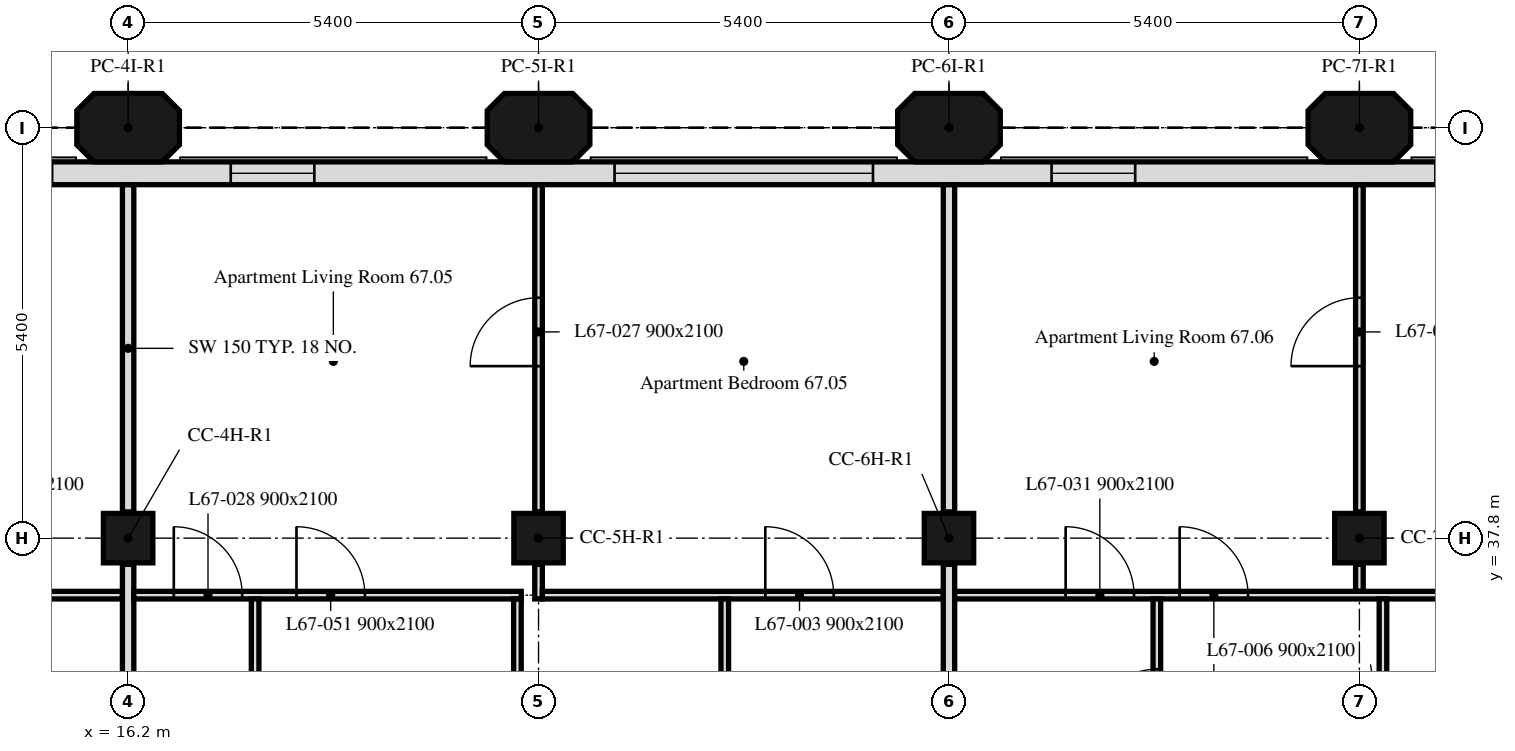
"""IFC4 building model, lengths in metres.
Left out: names, types, materials, properties, quantities, classifications, styles, units other than length and angle.
Written with IfcOpenShell. Run it as: python <this file> out.ifc"""

import sys

from ifc_helpers import new_model, si_unit, direction, frame, frame_2d, origin, origin_2d, place, context, subcontext, project, spatial, polyline, rectangle, outline, extrude, element, fill, save


model = new_model("IFC4")
c1 = context("Model", 3, precision=1e-05, world=origin(), true_north=direction((0.0, 1.0)))
c2 = subcontext(c1, "Body", "Model", "MODEL_VIEW")
j1 = project(units=[si_unit("LENGTHUNIT", "METRE"), si_unit("PLANEANGLEUNIT", "RADIAN")], contexts=[c1])
p1 = place(None, origin())
s1 = spatial("IfcSite", under=j1, at=p1, CompositionType="ELEMENT")
p2 = place(p1, origin())
s2 = spatial("IfcBuilding", under=s1, at=p2, CompositionType="ELEMENT")
p3 = place(p2, frame((0.0, 0.0, 275.2)))
s3 = spatial("IfcBuildingStorey", under=s2, at=p3, CompositionType="ELEMENT", Elevation=275.2)
for number, where, z_axis, x_axis in (
    (1, (16.2, 37.8, 0.0), (0.0, 0.0, 1.0), (1.0, 0.0, 0.0)),
    (2, (21.6, 37.8, 0.0), (0.0, 0.0, 1.0), (1.0, 0.0, 0.0)),
    (3, (27.0, 37.8, 0.0), (0.0, 0.0, 1.0), (1.0, 0.0, 0.0)),
    (4, (32.4, 37.8, 0.0), (0.0, 0.0, 1.0), (1.0, 0.0, 0.0)),
):
    element("IfcColumn", number, at=place(p3, frame(where, z_axis=z_axis, x_axis=x_axis)), inside=s3, PredefinedType="COLUMN", context=c2, shape_type="SweptSolid", body=[
        extrude(rectangle(XDim=0.65, YDim=0.65, at=origin_2d()), origin(), (0.0, 0.0, 1.0), 3.0),
    ])
for number, where, z_axis, x_axis in (
    (5, (16.2, 43.2, 0.0), (0.0, 0.0, 1.0), (1.0, 0.0, 0.0)),
    (6, (21.6, 43.2, 0.0), (0.0, 0.0, 1.0), (1.0, 0.0, 0.0)),
    (7, (27.0, 43.2, 0.0), (0.0, 0.0, 1.0), (1.0, 0.0, 0.0)),
    (8, (32.4, 43.2, 0.0), (0.0, 0.0, 1.0), (1.0, 0.0, 0.0)),
):
    element("IfcColumn", number, at=place(p3, frame(where, z_axis=z_axis, x_axis=x_axis)), inside=s3, PredefinedType="COLUMN", context=c2, shape_type="SweptSolid", body=[
        extrude(outline(polyline([(-0.45, -0.45), (0.45, -0.45), (0.675, -0.225), (0.675, 0.225), (0.45, 0.45), (-0.45, 0.45), (-0.675, 0.225), (-0.675, -0.225), (-0.45, -0.45)])), origin(), (0.0, 0.0, 1.0), 3.0),
    ])
p4 = place(p3, frame((43.014, 42.6, 0.0), z_axis=(0.0, 0.0, 1.0), x_axis=(-1.0, 0.0, 0.0)))
e9 = element("IfcWall", 9, at=p4, inside=s3, PredefinedType="SOLIDWALL", context=c2, shape_type="SweptSolid", body=[
    extrude(rectangle(XDim=32.027, YDim=0.3, at=frame_2d((16.014, 0.0))), origin(), (0.0, 0.0, 1.0), 3.0),
])
p5 = place(p4, frame((2.764, 0.0, 0.9)))
e10 = element("IfcOpeningElement", 10, at=p5, cuts=e9, PredefinedType="OPENING", context=c2, shape_type="SweptSolid", body=[
    extrude(rectangle(XDim=1.1, YDim=1.7, at=frame_2d((0.55, 0.85))), frame((0.0, 0.16, 0.0), z_axis=(0.0, -1.0, 0.0), x_axis=(1.0, 0.0, 0.0)), (0.0, 0.0, 1.0), 0.32),
])
p6 = place(p4, frame((6.214, 0.0, 0.9)))
e11 = element("IfcOpeningElement", 11, at=p6, cuts=e9, PredefinedType="OPENING", context=c2, shape_type="SweptSolid", body=[
    extrude(rectangle(XDim=3.4, YDim=1.7, at=frame_2d((1.7, 0.85))), frame((0.0, 0.16, 0.0), z_axis=(0.0, -1.0, 0.0), x_axis=(1.0, 0.0, 0.0)), (0.0, 0.0, 1.0), 0.32),
])
p7 = place(p4, frame((13.564, 0.0, 0.9)))
e12 = element("IfcOpeningElement", 12, at=p7, cuts=e9, PredefinedType="OPENING", context=c2, shape_type="SweptSolid", body=[
    extrude(rectangle(XDim=1.1, YDim=1.7, at=frame_2d((0.55, 0.85))), frame((0.0, 0.16, 0.0), z_axis=(0.0, -1.0, 0.0), x_axis=(1.0, 0.0, 0.0)), (0.0, 0.0, 1.0), 0.32),
])
p8 = place(p4, frame((17.014, 0.0, 0.9)))
e13 = element("IfcOpeningElement", 13, at=p8, cuts=e9, PredefinedType="OPENING", context=c2, shape_type="SweptSolid", body=[
    extrude(rectangle(XDim=3.4, YDim=1.7, at=frame_2d((1.7, 0.85))), frame((0.0, 0.16, 0.0), z_axis=(0.0, -1.0, 0.0), x_axis=(1.0, 0.0, 0.0)), (0.0, 0.0, 1.0), 0.32),
])
p9 = place(p4, frame((24.364, 0.0, 0.9)))
e14 = element("IfcOpeningElement", 14, at=p9, cuts=e9, PredefinedType="OPENING", context=c2, shape_type="SweptSolid", body=[
    extrude(rectangle(XDim=1.1, YDim=1.7, at=frame_2d((0.55, 0.85))), frame((0.0, 0.16, 0.0), z_axis=(0.0, -1.0, 0.0), x_axis=(1.0, 0.0, 0.0)), (0.0, 0.0, 1.0), 0.32),
])
p10 = place(p4, frame((27.814, 0.0, 0.9)))
e15 = element("IfcOpeningElement", 15, at=p10, cuts=e9, PredefinedType="OPENING", context=c2, shape_type="SweptSolid", body=[
    extrude(rectangle(XDim=3.4, YDim=1.7, at=frame_2d((1.7, 0.85))), frame((0.0, 0.16, 0.0), z_axis=(0.0, -1.0, 0.0), x_axis=(1.0, 0.0, 0.0)), (0.0, 0.0, 1.0), 0.32),
])
p11 = place(p3, frame((6.151, 37.05, 0.0), z_axis=(0.0, 0.0, 1.0), x_axis=(1.0, 0.0, 0.0)))
e16 = element("IfcWall", 16, at=p11, inside=s3, PredefinedType="PARTITIONING", context=c2, shape_type="SweptSolid", body=[
    extrude(rectangle(XDim=9.974, YDim=0.1, at=frame_2d((4.987, 0.0))), origin(), (0.0, 0.0, 1.0), 3.0),
])
p12 = place(p11, frame((8.039, 0.0, 0.0)))
e17 = element("IfcOpeningElement", 17, at=p12, cuts=e16, PredefinedType="OPENING", context=c2, shape_type="SweptSolid", body=[
    extrude(rectangle(XDim=0.9, YDim=2.1, at=frame_2d((0.45, 1.05))), frame((0.0, 0.05, 0.0), z_axis=(0.0, -1.0, 0.0), x_axis=(1.0, 0.0, 0.0)), (0.0, 0.0, 1.0), 0.1),
])
p13 = place(p11, frame((0.879, 0.0, 0.0)))
e18 = element("IfcOpeningElement", 18, at=p13, cuts=e16, PredefinedType="OPENING", context=c2, shape_type="SweptSolid", body=[
    extrude(rectangle(XDim=0.9, YDim=2.1, at=frame_2d((0.45, 1.05))), frame((0.0, 0.05, 0.0), z_axis=(0.0, -1.0, 0.0), x_axis=(1.0, 0.0, 0.0)), (0.0, 0.0, 1.0), 0.1),
])
p14 = place(p11, frame((2.249, 0.0, 0.0)))
e19 = element("IfcOpeningElement", 19, at=p14, cuts=e16, PredefinedType="OPENING", context=c2, shape_type="SweptSolid", body=[
    extrude(rectangle(XDim=0.9, YDim=2.1, at=frame_2d((0.45, 1.05))), frame((0.0, 0.05, 0.0), z_axis=(0.0, -1.0, 0.0), x_axis=(1.0, 0.0, 0.0)), (0.0, 0.0, 1.0), 0.1),
])
p15 = place(p3, frame((16.2, 38.145, 0.0), z_axis=(0.0, 0.0, 1.0), x_axis=(0.0, 1.0, 0.0)))
e20 = element("IfcWall", 20, at=p15, inside=s3, PredefinedType="PARTITIONING", context=c2, shape_type="SweptSolid", body=[
    extrude(rectangle(XDim=4.304, YDim=0.15, at=frame_2d((2.152, 0.0))), origin(), (0.0, 0.0, 1.0), 3.0),
])
p16 = place(p3, frame((16.2, 34.275, 0.0), z_axis=(0.0, 0.0, 1.0), x_axis=(0.0, 1.0, 0.0)))
e21 = element("IfcWall", 21, at=p16, inside=s3, PredefinedType="PARTITIONING", context=c2, shape_type="SweptSolid", body=[
    extrude(rectangle(XDim=3.18, YDim=0.15, at=frame_2d((1.59, 0.0))), origin(), (0.0, 0.0, 1.0), 3.0),
])
p17 = place(p3, frame((16.275, 37.05, 0.0), z_axis=(0.0, 0.0, 1.0), x_axis=(1.0, 0.0, 0.0)))
e22 = element("IfcWall", 22, at=p17, inside=s3, PredefinedType="PARTITIONING", context=c2, shape_type="SweptSolid", body=[
    extrude(rectangle(XDim=5.097, YDim=0.1, at=frame_2d((2.549, 0.0))), origin(), (0.0, 0.0, 1.0), 3.0),
])
p18 = place(p17, frame((0.526, 0.0, 0.0)))
e23 = element("IfcOpeningElement", 23, at=p18, cuts=e22, PredefinedType="OPENING", context=c2, shape_type="SweptSolid", body=[
    extrude(rectangle(XDim=0.9, YDim=2.1, at=frame_2d((0.45, 1.05))), frame((0.0, 0.05, 0.0), z_axis=(0.0, -1.0, 0.0), x_axis=(1.0, 0.0, 0.0)), (0.0, 0.0, 1.0), 0.1),
])
p19 = place(p17, frame((2.14, 0.0, 0.0)))
e24 = element("IfcOpeningElement", 24, at=p19, cuts=e22, PredefinedType="OPENING", context=c2, shape_type="SweptSolid", body=[
    extrude(rectangle(XDim=0.9, YDim=2.1, at=frame_2d((0.45, 1.05))), frame((0.0, 0.05, 0.0), z_axis=(0.0, -1.0, 0.0), x_axis=(1.0, 0.0, 0.0)), (0.0, 0.0, 1.0), 0.1),
])
p20 = place(p3, frame((21.6, 37.0, 0.0), z_axis=(0.0, 0.0, 1.0), x_axis=(0.0, 1.0, 0.0)))
e25 = element("IfcWall", 25, at=p20, inside=s3, PredefinedType="PARTITIONING", context=c2, shape_type="SweptSolid", body=[
    extrude(rectangle(XDim=0.455, YDim=0.1, at=frame_2d((0.228, 0.0))), origin(), (0.0, 0.0, 1.0), 3.0),
])
p21 = place(p3, frame((21.6, 38.145, 0.0), z_axis=(0.0, 0.0, 1.0), x_axis=(0.0, 1.0, 0.0)))
e26 = element("IfcWall", 26, at=p21, inside=s3, PredefinedType="PARTITIONING", context=c2, shape_type="SweptSolid", body=[
    extrude(rectangle(XDim=4.304, YDim=0.1, at=frame_2d((2.152, 0.0))), origin(), (0.0, 0.0, 1.0), 3.0),
])
p22 = place(p21, frame((1.918, 0.0, 0.0)))
e27 = element("IfcOpeningElement", 27, at=p22, cuts=e26, PredefinedType="OPENING", context=c2, shape_type="SweptSolid", body=[
    extrude(rectangle(XDim=0.9, YDim=2.1, at=frame_2d((0.45, 1.05))), frame((0.0, 0.05, 0.0), z_axis=(0.0, -1.0, 0.0), x_axis=(1.0, 0.0, 0.0)), (0.0, 0.0, 1.0), 0.1),
])
p23 = place(p3, frame((21.65, 37.05, 0.0), z_axis=(0.0, 0.0, 1.0), x_axis=(1.0, 0.0, 0.0)))
e28 = element("IfcWall", 28, at=p23, inside=s3, PredefinedType="PARTITIONING", context=c2, shape_type="SweptSolid", body=[
    extrude(rectangle(XDim=5.275, YDim=0.1, at=frame_2d((2.638, 0.0))), origin(), (0.0, 0.0, 1.0), 3.0),
])
p24 = place(p23, frame((2.933, 0.0, 0.0)))
e29 = element("IfcOpeningElement", 29, at=p24, cuts=e28, PredefinedType="OPENING", context=c2, shape_type="SweptSolid", body=[
    extrude(rectangle(XDim=0.9, YDim=2.1, at=frame_2d((0.45, 1.05))), frame((0.0, 0.05, 0.0), z_axis=(0.0, -1.0, 0.0), x_axis=(1.0, 0.0, 0.0)), (0.0, 0.0, 1.0), 0.1),
])
p25 = place(p3, frame((27.0, 38.145, 0.0), z_axis=(0.0, 0.0, 1.0), x_axis=(0.0, 1.0, 0.0)))
e30 = element("IfcWall", 30, at=p25, inside=s3, PredefinedType="PARTITIONING", context=c2, shape_type="SweptSolid", body=[
    extrude(rectangle(XDim=4.304, YDim=0.15, at=frame_2d((2.152, 0.0))), origin(), (0.0, 0.0, 1.0), 3.0),
])
p26 = place(p3, frame((17.871, 34.275, 0.0), z_axis=(0.0, 0.0, 1.0), x_axis=(0.0, 1.0, 0.0)))
e31 = element("IfcWall", 31, at=p26, inside=s3, PredefinedType="PARTITIONING", context=c2, shape_type="SweptSolid", body=[
    extrude(rectangle(XDim=2.725, YDim=0.1, at=frame_2d((1.363, 0.0))), origin(), (0.0, 0.0, 1.0), 3.0),
])
p27 = place(p26, frame((0.563, 0.0, 0.0)))
e32 = element("IfcOpeningElement", 32, at=p27, cuts=e31, PredefinedType="OPENING", context=c2, shape_type="SweptSolid", body=[
    extrude(rectangle(XDim=0.9, YDim=2.1, at=frame_2d((0.45, 1.05))), frame((0.0, 0.05, 0.0), z_axis=(0.0, -1.0, 0.0), x_axis=(1.0, 0.0, 0.0)), (0.0, 0.0, 1.0), 0.1),
])
p28 = place(p3, frame((21.322, 34.275, 0.0), z_axis=(0.0, 0.0, 1.0), x_axis=(0.0, 1.0, 0.0)))
e33 = element("IfcWall", 33, at=p28, inside=s3, PredefinedType="PARTITIONING", context=c2, shape_type="SweptSolid", body=[
    extrude(rectangle(XDim=2.725, YDim=0.1, at=frame_2d((1.363, 0.0))), origin(), (0.0, 0.0, 1.0), 3.0),
])
p29 = place(p28, frame((0.394, 0.0, 0.0)))
e34 = element("IfcOpeningElement", 34, at=p29, cuts=e33, PredefinedType="OPENING", context=c2, shape_type="SweptSolid", body=[
    extrude(rectangle(XDim=0.9, YDim=2.1, at=frame_2d((0.45, 1.05))), frame((0.0, 0.05, 0.0), z_axis=(0.0, -1.0, 0.0), x_axis=(1.0, 0.0, 0.0)), (0.0, 0.0, 1.0), 0.1),
])
p30 = place(p3, frame((24.05, 34.275, 0.0), z_axis=(0.0, 0.0, 1.0), x_axis=(0.0, 1.0, 0.0)))
e35 = element("IfcWall", 35, at=p30, inside=s3, PredefinedType="PARTITIONING", context=c2, shape_type="SweptSolid", body=[
    extrude(rectangle(XDim=2.725, YDim=0.1, at=frame_2d((1.363, 0.0))), origin(), (0.0, 0.0, 1.0), 3.0),
])
p31 = place(p3, frame((27.0, 34.275, 0.0), z_axis=(0.0, 0.0, 1.0), x_axis=(0.0, 1.0, 0.0)))
e36 = element("IfcWall", 36, at=p31, inside=s3, PredefinedType="PARTITIONING", context=c2, shape_type="SweptSolid", body=[
    extrude(rectangle(XDim=3.18, YDim=0.15, at=frame_2d((1.59, 0.0))), origin(), (0.0, 0.0, 1.0), 3.0),
])
p32 = place(p3, frame((32.4, 37.1, 0.0), z_axis=(0.0, 0.0, 1.0), x_axis=(0.0, 1.0, 0.0)))
e37 = element("IfcWall", 37, at=p32, inside=s3, PredefinedType="PARTITIONING", context=c2, shape_type="SweptSolid", body=[
    extrude(rectangle(XDim=0.355, YDim=0.1, at=frame_2d((0.177, 0.0))), origin(), (0.0, 0.0, 1.0), 3.0),
])
p33 = place(p3, frame((32.4, 38.145, 0.0), z_axis=(0.0, 0.0, 1.0), x_axis=(0.0, 1.0, 0.0)))
e38 = element("IfcWall", 38, at=p33, inside=s3, PredefinedType="PARTITIONING", context=c2, shape_type="SweptSolid", body=[
    extrude(rectangle(XDim=4.304, YDim=0.1, at=frame_2d((2.152, 0.0))), origin(), (0.0, 0.0, 1.0), 3.0),
])
p34 = place(p33, frame((1.918, 0.0, 0.0)))
e39 = element("IfcOpeningElement", 39, at=p34, cuts=e38, PredefinedType="OPENING", context=c2, shape_type="SweptSolid", body=[
    extrude(rectangle(XDim=0.9, YDim=2.1, at=frame_2d((0.45, 1.05))), frame((0.0, 0.05, 0.0), z_axis=(0.0, -1.0, 0.0), x_axis=(1.0, 0.0, 0.0)), (0.0, 0.0, 1.0), 0.1),
])
p35 = place(p3, frame((27.075, 37.05, 0.0), z_axis=(0.0, 0.0, 1.0), x_axis=(1.0, 0.0, 0.0)))
e40 = element("IfcWall", 40, at=p35, inside=s3, PredefinedType="PARTITIONING", context=c2, shape_type="SweptSolid", body=[
    extrude(rectangle(XDim=10.65, YDim=0.1, at=frame_2d((5.325, 0.0))), origin(), (0.0, 0.0, 1.0), 3.0),
])
p36 = place(p35, frame((7.946, 0.0, 0.0)))
e41 = element("IfcOpeningElement", 41, at=p36, cuts=e40, PredefinedType="OPENING", context=c2, shape_type="SweptSolid", body=[
    extrude(rectangle(XDim=0.9, YDim=2.1, at=frame_2d((0.45, 1.05))), frame((0.0, 0.05, 0.0), z_axis=(0.0, -1.0, 0.0), x_axis=(1.0, 0.0, 0.0)), (0.0, 0.0, 1.0), 0.1),
])
p37 = place(p35, frame((1.46, 0.0, 0.0)))
e42 = element("IfcOpeningElement", 42, at=p37, cuts=e40, PredefinedType="OPENING", context=c2, shape_type="SweptSolid", body=[
    extrude(rectangle(XDim=0.9, YDim=2.1, at=frame_2d((0.45, 1.05))), frame((0.0, 0.05, 0.0), z_axis=(0.0, -1.0, 0.0), x_axis=(1.0, 0.0, 0.0)), (0.0, 0.0, 1.0), 0.1),
])
p38 = place(p35, frame((2.96, 0.0, 0.0)))
e43 = element("IfcOpeningElement", 43, at=p38, cuts=e40, PredefinedType="OPENING", context=c2, shape_type="SweptSolid", body=[
    extrude(rectangle(XDim=0.9, YDim=2.1, at=frame_2d((0.45, 1.05))), frame((0.0, 0.05, 0.0), z_axis=(0.0, -1.0, 0.0), x_axis=(1.0, 0.0, 0.0)), (0.0, 0.0, 1.0), 0.1),
])
p39 = place(p3, frame((29.735, 34.275, 0.0), z_axis=(0.0, 0.0, 1.0), x_axis=(0.0, 1.0, 0.0)))
e44 = element("IfcWall", 44, at=p39, inside=s3, PredefinedType="PARTITIONING", context=c2, shape_type="SweptSolid", body=[
    extrude(rectangle(XDim=2.725, YDim=0.1, at=frame_2d((1.363, 0.0))), origin(), (0.0, 0.0, 1.0), 3.0),
])
p40 = place(p39, frame((0.9, 0.0, 0.0)))
e45 = element("IfcOpeningElement", 45, at=p40, cuts=e44, PredefinedType="OPENING", context=c2, shape_type="SweptSolid", body=[
    extrude(rectangle(XDim=0.9, YDim=2.1, at=frame_2d((0.45, 1.05))), frame((0.0, 0.05, 0.0), z_axis=(0.0, -1.0, 0.0), x_axis=(1.0, 0.0, 0.0)), (0.0, 0.0, 1.0), 0.1),
])
p41 = place(p3, frame((32.71, 34.275, 0.0), z_axis=(0.0, 0.0, 1.0), x_axis=(0.0, 1.0, 0.0)))
e46 = element("IfcWall", 46, at=p41, inside=s3, PredefinedType="PARTITIONING", context=c2, shape_type="SweptSolid", body=[
    extrude(rectangle(XDim=2.725, YDim=0.1, at=frame_2d((1.363, 0.0))), origin(), (0.0, 0.0, 1.0), 3.0),
])
p42 = place(p41, frame((0.25, 0.0, 0.0)))
e47 = element("IfcOpeningElement", 47, at=p42, cuts=e46, PredefinedType="OPENING", context=c2, shape_type="SweptSolid", body=[
    extrude(rectangle(XDim=0.9, YDim=2.1, at=frame_2d((0.45, 1.05))), frame((0.0, 0.05, 0.0), z_axis=(0.0, -1.0, 0.0), x_axis=(1.0, 0.0, 0.0)), (0.0, 0.0, 1.0), 0.1),
])
p43 = place(p7, origin())
e48 = element("IfcWindow", 48, at=p43, inside=s3, PartitioningType="SINGLE_PANEL", PredefinedType="WINDOW", context=c2, shape_type="SweptSolid", body=[
    extrude(rectangle(XDim=1.1, YDim=1.7, at=frame_2d((0.55, 0.85))), frame((0.0, 0.03, 0.0), z_axis=(0.0, -1.0, 0.0), x_axis=(1.0, 0.0, 0.0)), (0.0, 0.0, 1.0), 0.06),
])
fill(e12, e48)
p44 = place(p8, origin())
e49 = element("IfcWindow", 49, at=p44, inside=s3, PartitioningType="SINGLE_PANEL", PredefinedType="WINDOW", context=c2, shape_type="SweptSolid", body=[
    extrude(rectangle(XDim=3.4, YDim=1.7, at=frame_2d((1.7, 0.85))), frame((0.0, 0.03, 0.0), z_axis=(0.0, -1.0, 0.0), x_axis=(1.0, 0.0, 0.0)), (0.0, 0.0, 1.0), 0.06),
])
fill(e13, e49)
p45 = place(p9, origin())
e50 = element("IfcWindow", 50, at=p45, inside=s3, PartitioningType="SINGLE_PANEL", PredefinedType="WINDOW", context=c2, shape_type="SweptSolid", body=[
    extrude(rectangle(XDim=1.1, YDim=1.7, at=frame_2d((0.55, 0.85))), frame((0.0, 0.03, 0.0), z_axis=(0.0, -1.0, 0.0), x_axis=(1.0, 0.0, 0.0)), (0.0, 0.0, 1.0), 0.06),
])
fill(e14, e50)
p46 = place(p24, origin())
e51 = element("IfcDoor", 51, at=p46, inside=s3, OperationType="SINGLE_SWING_RIGHT", PredefinedType="DOOR", context=c2, shape_type="SweptSolid", body=[
    extrude(rectangle(XDim=0.9, YDim=2.1, at=frame_2d((0.45, 1.05))), frame((0.0, 0.025, 0.0), z_axis=(0.0, -1.0, 0.0), x_axis=(1.0, 0.0, 0.0)), (0.0, 0.0, 1.0), 0.05),
])
fill(e29, e51)
p47 = place(p22, origin())
e52 = element("IfcDoor", 52, at=p47, inside=s3, OperationType="SINGLE_SWING_RIGHT", PredefinedType="DOOR", context=c2, shape_type="SweptSolid", body=[
    extrude(rectangle(XDim=0.9, YDim=2.1, at=frame_2d((0.45, 1.05))), frame((0.0, 0.025, 0.0), z_axis=(0.0, -1.0, 0.0), x_axis=(1.0, 0.0, 0.0)), (0.0, 0.0, 1.0), 0.05),
])
fill(e27, e52)
p48 = place(p18, origin())
e53 = element("IfcDoor", 53, at=p48, inside=s3, OperationType="SINGLE_SWING_LEFT", PredefinedType="DOOR", context=c2, shape_type="SweptSolid", body=[
    extrude(rectangle(XDim=0.9, YDim=2.1, at=frame_2d((0.45, 1.05))), frame((0.0, 0.025, 0.0), z_axis=(0.0, -1.0, 0.0), x_axis=(1.0, 0.0, 0.0)), (0.0, 0.0, 1.0), 0.05),
])
fill(e23, e53)
p49 = place(p34, origin())
e54 = element("IfcDoor", 54, at=p49, inside=s3, OperationType="SINGLE_SWING_LEFT", PredefinedType="DOOR", context=c2, shape_type="SweptSolid", body=[
    extrude(rectangle(XDim=0.9, YDim=2.1, at=frame_2d((0.45, 1.05))), frame((0.0, 0.025, 0.0), z_axis=(0.0, -1.0, 0.0), x_axis=(1.0, 0.0, 0.0)), (0.0, 0.0, 1.0), 0.05),
])
fill(e39, e54)
p50 = place(p37, origin())
e55 = element("IfcDoor", 55, at=p50, inside=s3, OperationType="SINGLE_SWING_LEFT", PredefinedType="DOOR", context=c2, shape_type="SweptSolid", body=[
    extrude(rectangle(XDim=0.9, YDim=2.1, at=frame_2d((0.45, 1.05))), frame((0.0, 0.025, 0.0), z_axis=(0.0, -1.0, 0.0), x_axis=(1.0, 0.0, 0.0)), (0.0, 0.0, 1.0), 0.05),
])
fill(e42, e55)
p51 = place(p40, origin())
e56 = element("IfcDoor", 56, at=p51, inside=s3, OperationType="SINGLE_SWING_LEFT", PredefinedType="DOOR", context=c2, shape_type="SweptSolid", body=[
    extrude(rectangle(XDim=0.9, YDim=2.1, at=frame_2d((0.45, 1.05))), frame((0.0, 0.025, 0.0), z_axis=(0.0, -1.0, 0.0), x_axis=(1.0, 0.0, 0.0)), (0.0, 0.0, 1.0), 0.05),
])
fill(e45, e56)
p52 = place(p19, origin())
e57 = element("IfcDoor", 57, at=p52, inside=s3, OperationType="SINGLE_SWING_RIGHT", PredefinedType="DOOR", context=c2, shape_type="SweptSolid", body=[
    extrude(rectangle(XDim=0.9, YDim=2.1, at=frame_2d((0.45, 1.05))), frame((0.0, 0.025, 0.0), z_axis=(0.0, -1.0, 0.0), x_axis=(1.0, 0.0, 0.0)), (0.0, 0.0, 1.0), 0.05),
])
fill(e24, e57)
p53 = place(p38, origin())
e58 = element("IfcDoor", 58, at=p53, inside=s3, OperationType="SINGLE_SWING_RIGHT", PredefinedType="DOOR", context=c2, shape_type="SweptSolid", body=[
    extrude(rectangle(XDim=0.9, YDim=2.1, at=frame_2d((0.45, 1.05))), frame((0.0, 0.025, 0.0), z_axis=(0.0, -1.0, 0.0), x_axis=(1.0, 0.0, 0.0)), (0.0, 0.0, 1.0), 0.05),
])
fill(e43, e58)
save(model, sys.argv[1])
